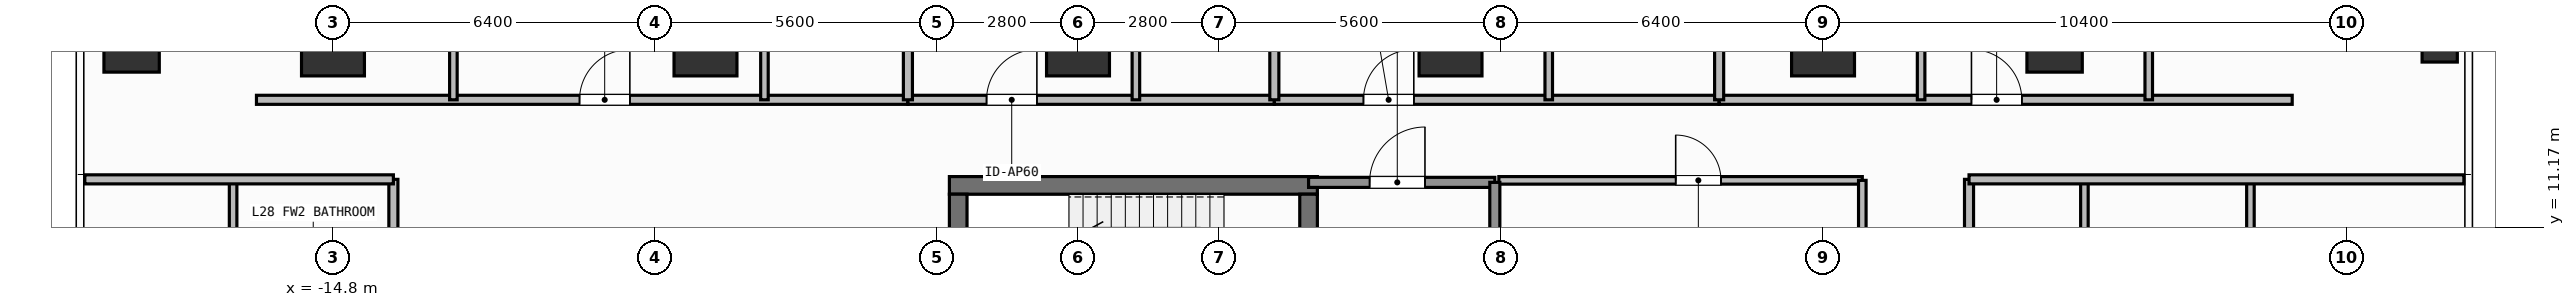
"""IFC4 building model, lengths in metres.
Left out: names, types, materials, properties, quantities, classifications, styles, units other than length and angle.
Written with IfcOpenShell. Run it as: python <this file> out.ifc"""

import sys

from ifc_helpers import new_model, si_unit, direction, frame, frame_2d, origin, origin_2d, place, context, subcontext, project, spatial, rectangle, hollow_rectangle, extrude, element, fill, save


model = new_model("IFC4")
c1 = context("Model", 3, precision=1e-05, world=origin(), true_north=direction((0.0, 1.0)))
c2 = subcontext(c1, "Body", "Model", "MODEL_VIEW")
j1 = project(units=[si_unit("LENGTHUNIT", "METRE"), si_unit("PLANEANGLEUNIT", "RADIAN")], contexts=[c1])
p1 = place(None, origin())
s1 = spatial("IfcSite", under=j1, at=p1, CompositionType="ELEMENT")
p2 = place(p1, origin())
s2 = spatial("IfcBuilding", under=s1, at=p2, CompositionType="ELEMENT")
p3 = place(p2, frame((0.0, 0.0, 113.4)))
s3 = spatial("IfcBuildingStorey", under=s2, at=p3, CompositionType="ELEMENT", Elevation=113.4)
p4 = place(p3, frame((-2.555, 12.0, 0.0), z_axis=(0.0, 0.0, 1.0), x_axis=(1.0, 0.0, 0.0)))
e1 = element("IfcWall", 1, at=p4, inside=s3, PredefinedType="SHEAR", context=c2, shape_type="SweptSolid", body=[
    extrude(rectangle(XDim=7.31, YDim=0.35, at=frame_2d((3.655, 0.0))), origin(), (0.0, 0.0, 1.0), 3.9),
])
p5 = place(p3, frame((-2.38, 8.9, 0.0), z_axis=(0.0, 0.0, 1.0), x_axis=(0.0, 1.0, 0.0)))
e2 = element("IfcWall", 2, at=p5, inside=s3, PredefinedType="SHEAR", context=c2, shape_type="SweptSolid", body=[
    extrude(rectangle(XDim=2.925, YDim=0.35, at=frame_2d((1.462, 0.0))), origin(), (0.0, 0.0, 1.0), 3.9),
])
p6 = place(p3, frame((4.58, 11.825, 0.0), z_axis=(0.0, 0.0, 1.0), x_axis=(0.0, -1.0, 0.0)))
e3 = element("IfcWall", 3, at=p6, inside=s3, PredefinedType="SHEAR", context=c2, shape_type="SweptSolid", body=[
    extrude(rectangle(XDim=2.925, YDim=0.35, at=frame_2d((1.462, 0.0))), origin(), (0.0, 0.0, 1.0), 3.9),
])
p7 = place(p6, frame((0.913, 0.0, 0.0)))
e4 = element("IfcOpeningElement", 4, at=p7, cuts=e3, PredefinedType="OPENING", context=c2, shape_type="SweptSolid", body=[
    extrude(rectangle(XDim=1.1, YDim=2.15, at=frame_2d((0.55, 1.075))), frame((0.0, 0.185, 0.0), z_axis=(0.0, -1.0, 0.0), x_axis=(1.0, 0.0, 0.0)), (0.0, 0.0, 1.0), 0.37),
])
for number, where, z_axis, x_axis in (
    (5, (-14.8, 14.8, 0.0), (0.0, 0.0, 1.0), (1.0, 0.0, 0.0)),
    (6, (-7.4, 14.8, 0.0), (0.0, 0.0, 1.0), (1.0, 0.0, 0.0)),
    (7, (0.0, 14.8, 0.0), (0.0, 0.0, 1.0), (1.0, 0.0, 0.0)),
    (8, (7.4, 14.8, 0.0), (0.0, 0.0, 1.0), (1.0, 0.0, 0.0)),
    (9, (14.8, 14.8, 0.0), (0.0, 0.0, 1.0), (1.0, 0.0, 0.0)),
):
    element("IfcColumn", number, at=place(p3, frame(where, z_axis=z_axis, x_axis=x_axis)), inside=s3, PredefinedType="COLUMN", context=c2, shape_type="SweptSolid", body=[
        extrude(rectangle(XDim=1.25, YDim=1.25, at=origin_2d()), origin(), (0.0, 0.0, 1.0), 3.9),
    ])
for number, where, z_axis, x_axis in (
    (10, (-18.8, 14.8, 0.0), (0.0, 0.0, 1.0), (1.0, 0.0, 0.0)),
    (11, (19.4, 14.8, 0.0), (0.0, 0.0, 1.0), (1.0, 0.0, 0.0)),
):
    element("IfcColumn", number, at=place(p3, frame(where, z_axis=z_axis, x_axis=x_axis)), inside=s3, PredefinedType="COLUMN", context=c2, shape_type="SweptSolid", body=[
        extrude(rectangle(XDim=1.1, YDim=1.1, at=origin_2d()), origin(), (0.0, 0.0, 1.0), 3.9),
    ])
p8 = place(p3, frame((27.05, 14.8, 0.0), z_axis=(0.0, 0.0, 1.0), x_axis=(1.0, 0.0, 0.0)))
e12 = element("IfcColumn", 12, at=p8, inside=s3, PredefinedType="COLUMN", context=c2, shape_type="SweptSolid", body=[
    extrude(hollow_rectangle(XDim=0.7, YDim=0.7, WallThickness=0.032, at=origin_2d()), origin(), (0.0, 0.0, 1.0), 3.9),
])
p9 = place(p3, frame((4.58, 12.06, 0.0), z_axis=(0.0, 0.0, 1.0), x_axis=(1.0, 0.0, 0.0)))
e13 = element("IfcWall", 13, at=p9, inside=s3, PredefinedType="SOLIDWALL", context=c2, shape_type="SweptSolid", body=[
    extrude(rectangle(XDim=3.7, YDim=0.2, at=frame_2d((1.85, 0.0))), origin(), (0.0, 0.0, 1.0), 3.68),
])
p10 = place(p9, frame((1.212, 0.0, 0.0)))
e14 = element("IfcOpeningElement", 14, at=p10, cuts=e13, PredefinedType="OPENING", context=c2, shape_type="SweptSolid", body=[
    extrude(rectangle(XDim=1.1, YDim=2.15, at=frame_2d((0.55, 1.075))), frame((0.0, 0.11, 0.0), z_axis=(0.0, -1.0, 0.0), x_axis=(1.0, 0.0, 0.0)), (0.0, 0.0, 1.0), 0.22),
])
p11 = place(p3, frame((8.36, 12.1, 0.0), z_axis=(0.0, 0.0, 1.0), x_axis=(1.0, 0.0, 0.0)))
e15 = element("IfcWall", 15, at=p11, inside=s3, PredefinedType="PARTITIONING", context=c2, shape_type="SweptSolid", body=[
    extrude(rectangle(XDim=7.22, YDim=0.15, at=frame_2d((3.61, 0.0))), origin(), (0.0, 0.0, 1.0), 3.68),
])
p12 = place(p11, frame((3.513, 0.0, 0.0)))
e16 = element("IfcOpeningElement", 16, at=p12, cuts=e15, PredefinedType="OPENING", context=c2, shape_type="SweptSolid", body=[
    extrude(rectangle(XDim=0.9, YDim=2.1, at=frame_2d((0.45, 1.05))), frame((0.0, 0.085, 0.0), z_axis=(0.0, -1.0, 0.0), x_axis=(1.0, 0.0, 0.0)), (0.0, 0.0, 1.0), 0.17),
])
p13 = place(p3, frame((-16.32, 13.7, 0.0), z_axis=(0.0, 0.0, 1.0), x_axis=(1.0, 0.0, 0.0)))
e17 = element("IfcWall", 17, at=p13, inside=s3, PredefinedType="PARTITIONING", context=c2, shape_type="SweptSolid", body=[
    extrude(rectangle(XDim=12.941, YDim=0.18, at=frame_2d((6.471, 0.0))), origin(), (0.0, 0.0, 1.0), 3.68),
])
p14 = place(p13, frame((6.417, 0.0, 0.0)))
e18 = element("IfcOpeningElement", 18, at=p14, cuts=e17, PredefinedType="OPENING", context=c2, shape_type="SweptSolid", body=[
    extrude(rectangle(XDim=1.0, YDim=2.2, at=frame_2d((0.5, 1.1))), frame((0.0, 0.1, 0.0), z_axis=(0.0, -1.0, 0.0), x_axis=(1.0, 0.0, 0.0)), (0.0, 0.0, 1.0), 0.2),
])
p15 = place(p3, frame((-12.408, 13.7, 0.0), z_axis=(0.0, 0.0, 1.0), x_axis=(0.0, 1.0, 0.0)))
e19 = element("IfcWall", 19, at=p15, inside=s3, PredefinedType="PARTITIONING", context=c2, shape_type="SweptSolid", body=[
    extrude(rectangle(XDim=6.664, YDim=0.15, at=frame_2d((3.332, 0.0))), origin(), (0.0, 0.0, 1.0), 3.68),
])
p16 = place(p15, frame((2.818, 0.0, 0.0)))
e20 = element("IfcOpeningElement", 20, at=p16, cuts=e19, PredefinedType="OPENING", context=c2, shape_type="SweptSolid", body=[
    extrude(rectangle(XDim=0.85, YDim=2.1, at=frame_2d((0.425, 1.05))), frame((0.0, 0.085, 0.0), z_axis=(0.0, -1.0, 0.0), x_axis=(1.0, 0.0, 0.0)), (0.0, 0.0, 1.0), 0.17),
])
p17 = place(p3, frame((-6.229, 13.7, 0.0), z_axis=(0.0, 0.0, 1.0), x_axis=(0.0, 1.0, 0.0)))
e21 = element("IfcWall", 21, at=p17, inside=s3, PredefinedType="PARTITIONING", context=c2, shape_type="SweptSolid", body=[
    extrude(rectangle(XDim=8.043, YDim=0.15, at=frame_2d((4.021, 0.0))), origin(), (0.0, 0.0, 1.0), 3.68),
])
p18 = place(p17, frame((3.685, 0.0, 0.0)))
e22 = element("IfcOpeningElement", 22, at=p18, cuts=e21, PredefinedType="OPENING", context=c2, shape_type="SweptSolid", body=[
    extrude(rectangle(XDim=0.85, YDim=2.1, at=frame_2d((0.425, 1.05))), frame((0.0, 0.085, 0.0), z_axis=(0.0, -1.0, 0.0), x_axis=(1.0, 0.0, 0.0)), (0.0, 0.0, 1.0), 0.17),
])
p19 = place(p3, frame((-3.379, 13.7, 0.0), z_axis=(0.0, 0.0, 1.0), x_axis=(1.0, 0.0, 0.0)))
e23 = element("IfcWall", 23, at=p19, inside=s3, PredefinedType="PARTITIONING", context=c2, shape_type="SweptSolid", body=[
    extrude(rectangle(XDim=7.279, YDim=0.18, at=frame_2d((3.639, 0.0))), origin(), (0.0, 0.0, 1.0), 3.68),
])
p20 = place(p19, frame((1.562, 0.0, 0.0)))
e24 = element("IfcOpeningElement", 24, at=p20, cuts=e23, PredefinedType="OPENING", context=c2, shape_type="SweptSolid", body=[
    extrude(rectangle(XDim=1.0, YDim=2.2, at=frame_2d((0.5, 1.1))), frame((0.0, 0.1, 0.0), z_axis=(0.0, -1.0, 0.0), x_axis=(1.0, 0.0, 0.0)), (0.0, 0.0, 1.0), 0.2),
])
p21 = place(p3, frame((1.15, 13.7, 0.0), z_axis=(0.0, 0.0, 1.0), x_axis=(0.0, 1.0, 0.0)))
e25 = element("IfcWall", 25, at=p21, inside=s3, PredefinedType="PARTITIONING", context=c2, shape_type="SweptSolid", body=[
    extrude(rectangle(XDim=6.32, YDim=0.15, at=frame_2d((3.16, 0.0))), origin(), (0.0, 0.0, 1.0), 3.68),
])
p22 = place(p21, frame((2.646, 0.0, 0.0)))
e26 = element("IfcOpeningElement", 26, at=p22, cuts=e25, PredefinedType="OPENING", context=c2, shape_type="SweptSolid", body=[
    extrude(rectangle(XDim=0.85, YDim=2.1, at=frame_2d((0.425, 1.05))), frame((0.0, 0.085, 0.0), z_axis=(0.0, -1.0, 0.0), x_axis=(1.0, 0.0, 0.0)), (0.0, 0.0, 1.0), 0.17),
])
p23 = place(p3, frame((3.9, 13.7, 0.0), z_axis=(0.0, 0.0, 1.0), x_axis=(1.0, 0.0, 0.0)))
e27 = element("IfcWall", 27, at=p23, inside=s3, PredefinedType="PARTITIONING", context=c2, shape_type="SweptSolid", body=[
    extrude(rectangle(XDim=8.836, YDim=0.18, at=frame_2d((4.418, 0.0))), origin(), (0.0, 0.0, 1.0), 3.68),
])
p24 = place(p23, frame((1.771, 0.0, 0.0)))
e28 = element("IfcOpeningElement", 28, at=p24, cuts=e27, PredefinedType="OPENING", context=c2, shape_type="SweptSolid", body=[
    extrude(rectangle(XDim=1.0, YDim=2.2, at=frame_2d((0.5, 1.1))), frame((0.0, 0.1, 0.0), z_axis=(0.0, -1.0, 0.0), x_axis=(1.0, 0.0, 0.0)), (0.0, 0.0, 1.0), 0.2),
])
p25 = place(p3, frame((9.351, 13.7, 0.0), z_axis=(0.0, 0.0, 1.0), x_axis=(0.0, 1.0, 0.0)))
e29 = element("IfcWall", 29, at=p25, inside=s3, PredefinedType="PARTITIONING", context=c2, shape_type="SweptSolid", body=[
    extrude(rectangle(XDim=6.32, YDim=0.15, at=frame_2d((3.16, 0.0))), origin(), (0.0, 0.0, 1.0), 3.68),
])
p26 = place(p25, frame((2.646, 0.0, 0.0)))
e30 = element("IfcOpeningElement", 30, at=p26, cuts=e29, PredefinedType="OPENING", context=c2, shape_type="SweptSolid", body=[
    extrude(rectangle(XDim=0.85, YDim=2.1, at=frame_2d((0.425, 1.05))), frame((0.0, 0.085, 0.0), z_axis=(0.0, -1.0, 0.0), x_axis=(1.0, 0.0, 0.0)), (0.0, 0.0, 1.0), 0.17),
])
p27 = place(p3, frame((12.736, 13.7, 0.0), z_axis=(0.0, 0.0, 1.0), x_axis=(1.0, 0.0, 0.0)))
e31 = element("IfcWall", 31, at=p27, inside=s3, PredefinedType="PARTITIONING", context=c2, shape_type="SweptSolid", body=[
    extrude(rectangle(XDim=11.384, YDim=0.18, at=frame_2d((5.692, 0.0))), origin(), (0.0, 0.0, 1.0), 3.68),
])
p28 = place(p27, frame((5.012, 0.0, 0.0)))
e32 = element("IfcOpeningElement", 32, at=p28, cuts=e31, PredefinedType="OPENING", context=c2, shape_type="SweptSolid", body=[
    extrude(rectangle(XDim=1.0, YDim=2.2, at=frame_2d((0.5, 1.1))), frame((0.0, 0.1, 0.0), z_axis=(0.0, -1.0, 0.0), x_axis=(1.0, 0.0, 0.0)), (0.0, 0.0, 1.0), 0.2),
])
p29 = place(p3, frame((16.748, 13.7, 0.0), z_axis=(0.0, 0.0, 1.0), x_axis=(0.0, 1.0, 0.0)))
e33 = element("IfcWall", 33, at=p29, inside=s3, PredefinedType="PARTITIONING", context=c2, shape_type="SweptSolid", body=[
    extrude(rectangle(XDim=6.664, YDim=0.15, at=frame_2d((3.332, 0.0))), origin(), (0.0, 0.0, 1.0), 3.68),
])
p30 = place(p29, frame((2.818, 0.0, 0.0)))
e34 = element("IfcOpeningElement", 34, at=p30, cuts=e33, PredefinedType="OPENING", context=c2, shape_type="SweptSolid", body=[
    extrude(rectangle(XDim=0.85, YDim=2.1, at=frame_2d((0.425, 1.05))), frame((0.0, 0.085, 0.0), z_axis=(0.0, -1.0, 0.0), x_axis=(1.0, 0.0, 0.0)), (0.0, 0.0, 1.0), 0.17),
])
p31 = place(p3, frame((21.27, 13.7, 0.0), z_axis=(0.0, 0.0, 1.0), x_axis=(0.0, 1.0, 0.0)))
e35 = element("IfcWall", 35, at=p31, inside=s3, PredefinedType="PARTITIONING", context=c2, shape_type="SweptSolid", body=[
    extrude(rectangle(XDim=8.043, YDim=0.15, at=frame_2d((4.021, 0.0))), origin(), (0.0, 0.0, 1.0), 3.68),
])
p32 = place(p31, frame((3.685, 0.0, 0.0)))
e36 = element("IfcOpeningElement", 36, at=p32, cuts=e35, PredefinedType="OPENING", context=c2, shape_type="SweptSolid", body=[
    extrude(rectangle(XDim=0.85, YDim=2.1, at=frame_2d((0.425, 1.05))), frame((0.0, 0.085, 0.0), z_axis=(0.0, -1.0, 0.0), x_axis=(1.0, 0.0, 0.0)), (0.0, 0.0, 1.0), 0.17),
])
p33 = place(p3, frame((-13.6, 1.018, 0.0), z_axis=(0.0, 0.0, 1.0), x_axis=(0.0, 1.0, 0.0)))
e37 = element("IfcWall", 37, at=p33, inside=s3, PredefinedType="PARTITIONING", context=c2, shape_type="SweptSolid", body=[
    extrude(rectangle(XDim=11.102, YDim=0.18, at=frame_2d((5.551, 0.0))), origin(), (0.0, 0.0, 1.0), 3.68),
])
p34 = place(p33, frame((4.606, 0.0, 0.0)))
e38 = element("IfcOpeningElement", 38, at=p34, cuts=e37, PredefinedType="OPENING", context=c2, shape_type="SweptSolid", body=[
    extrude(rectangle(XDim=1.0, YDim=2.2, at=frame_2d((0.5, 1.1))), frame((0.0, 0.1, 0.0), z_axis=(0.0, -1.0, 0.0), x_axis=(1.0, 0.0, 0.0)), (0.0, 0.0, 1.0), 0.2),
])
p35 = place(p3, frame((17.7, -12.12, 0.0), z_axis=(0.0, 0.0, 1.0), x_axis=(0.0, 1.0, 0.0)))
e39 = element("IfcWall", 39, at=p35, inside=s3, PredefinedType="PARTITIONING", context=c2, shape_type="SweptSolid", body=[
    extrude(rectangle(XDim=24.24, YDim=0.18, at=frame_2d((12.12, 0.0))), origin(), (0.0, 0.0, 1.0), 3.68),
])
p36 = place(p35, frame((11.62, 0.0, 0.0)))
e40 = element("IfcOpeningElement", 40, at=p36, cuts=e39, PredefinedType="OPENING", context=c2, shape_type="SweptSolid", body=[
    extrude(rectangle(XDim=1.0, YDim=2.2, at=frame_2d((0.5, 1.1))), frame((0.0, 0.1, 0.0), z_axis=(0.0, -1.0, 0.0), x_axis=(1.0, 0.0, 0.0)), (0.0, 0.0, 1.0), 0.2),
])
p37 = place(p3, frame((8.28, 8.875, 0.0), z_axis=(0.0, 0.0, 1.0), x_axis=(0.0, 1.0, 0.0)))
e41 = element("IfcWall", 41, at=p37, inside=s3, PredefinedType="SOLIDWALL", context=c2, shape_type="SweptSolid", body=[
    extrude(rectangle(XDim=3.185, YDim=0.2, at=frame_2d((1.593, 0.0))), origin(), (0.0, 0.0, 1.0), 3.68),
])
p38 = place(p3, frame((15.58, 5.85, 0.0), z_axis=(0.0, 0.0, 1.0), x_axis=(0.0, 1.0, 0.0)))
e42 = element("IfcWall", 42, at=p38, inside=s3, PredefinedType="PARTITIONING", context=c2, shape_type="SweptSolid", body=[
    extrude(rectangle(XDim=6.25, YDim=0.15, at=frame_2d((3.125, 0.0))), origin(), (0.0, 0.0, 1.0), 3.68),
])
for number, where, z_axis, x_axis in (
    (43, (-3.379, 13.7, 0.0), (0.0, 0.0, 1.0), (0.0, 1.0, 0.0)),
    (44, (3.9, 13.7, 0.0), (0.0, 0.0, 1.0), (0.0, 1.0, 0.0)),
    (45, (12.736, 13.7, 0.0), (0.0, 0.0, 1.0), (0.0, 1.0, 0.0)),
):
    element("IfcWall", number, at=place(p3, frame(where, z_axis=z_axis, x_axis=x_axis)), inside=s3, PredefinedType="PARTITIONING", context=c2, shape_type="SweptSolid", body=[
        extrude(rectangle(XDim=15.73, YDim=0.18, at=frame_2d((7.865, 0.0))), origin(), (0.0, 0.0, 1.0), 3.68),
    ])
p39 = place(p3, frame((-16.784, 8.394, 0.0), z_axis=(0.0, 0.0, 1.0), x_axis=(0.0, 1.0, 0.0)))
e46 = element("IfcWall", 46, at=p39, inside=s3, PredefinedType="PARTITIONING", context=c2, shape_type="SweptSolid", body=[
    extrude(rectangle(XDim=3.726, YDim=0.15, at=frame_2d((1.863, 0.0))), origin(), (0.0, 0.0, 1.0), 3.68),
])
p40 = place(p3, frame((-19.73, 12.12, 0.0), z_axis=(0.0, 0.0, 1.0), x_axis=(1.0, 0.0, 0.0)))
e47 = element("IfcWall", 47, at=p40, inside=s3, PredefinedType="PARTITIONING", context=c2, shape_type="SweptSolid", body=[
    extrude(rectangle(XDim=6.13, YDim=0.18, at=frame_2d((3.065, 0.0))), origin(), (0.0, 0.0, 1.0), 3.68),
])
for number, where, z_axis, x_axis in (
    (48, (19.992, 5.436, 0.0), (0.0, 0.0, 1.0), (0.0, 1.0, 0.0)),
    (49, (23.29, 5.436, 0.0), (0.0, 0.0, 1.0), (0.0, 1.0, 0.0)),
):
    element("IfcWall", number, at=place(p3, frame(where, z_axis=z_axis, x_axis=x_axis)), inside=s3, PredefinedType="PARTITIONING", context=c2, shape_type="SweptSolid", body=[
        extrude(rectangle(XDim=6.684, YDim=0.15, at=frame_2d((3.342, 0.0))), origin(), (0.0, 0.0, 1.0), 3.68),
    ])
p41 = place(p3, frame((17.7, 12.12, 0.0), z_axis=(0.0, 0.0, 1.0), x_axis=(1.0, 0.0, 0.0)))
e50 = element("IfcWall", 50, at=p41, inside=s3, PredefinedType="PARTITIONING", context=c2, shape_type="SweptSolid", body=[
    extrude(rectangle(XDim=9.83, YDim=0.18, at=frame_2d((4.915, 0.0))), origin(), (0.0, 0.0, 1.0), 3.68),
])
p42 = place(p10, origin())
e51 = element("IfcDoor", 51, at=p42, inside=s3, OperationType="SINGLE_SWING_RIGHT", PredefinedType="DOOR", context=c2, shape_type="SweptSolid", body=[
    extrude(rectangle(XDim=1.1, YDim=2.15, at=frame_2d((0.55, 1.075))), frame((0.0, 0.025, 0.0), z_axis=(0.0, -1.0, 0.0), x_axis=(1.0, 0.0, 0.0)), (0.0, 0.0, 1.0), 0.05),
])
fill(e14, e51)
p43 = place(p12, origin())
e52 = element("IfcDoor", 52, at=p43, inside=s3, OperationType="SINGLE_SWING_LEFT", PredefinedType="DOOR", context=c2, shape_type="SweptSolid", body=[
    extrude(rectangle(XDim=0.9, YDim=2.1, at=frame_2d((0.45, 1.05))), frame((0.0, 0.025, 0.0), z_axis=(0.0, -1.0, 0.0), x_axis=(1.0, 0.0, 0.0)), (0.0, 0.0, 1.0), 0.05),
])
fill(e16, e52)
p44 = place(p14, origin())
e53 = element("IfcDoor", 53, at=p44, inside=s3, OperationType="SINGLE_SWING_RIGHT", PredefinedType="DOOR", context=c2, shape_type="SweptSolid", body=[
    extrude(rectangle(XDim=1.0, YDim=2.2, at=frame_2d((0.5, 1.1))), frame((0.0, 0.025, 0.0), z_axis=(0.0, -1.0, 0.0), x_axis=(1.0, 0.0, 0.0)), (0.0, 0.0, 1.0), 0.05),
])
fill(e18, e53)
p45 = place(p20, origin())
e54 = element("IfcDoor", 54, at=p45, inside=s3, OperationType="SINGLE_SWING_RIGHT", PredefinedType="DOOR", context=c2, shape_type="SweptSolid", body=[
    extrude(rectangle(XDim=1.0, YDim=2.2, at=frame_2d((0.5, 1.1))), frame((0.0, 0.025, 0.0), z_axis=(0.0, -1.0, 0.0), x_axis=(1.0, 0.0, 0.0)), (0.0, 0.0, 1.0), 0.05),
])
fill(e24, e54)
p46 = place(p24, origin())
e55 = element("IfcDoor", 55, at=p46, inside=s3, OperationType="SINGLE_SWING_RIGHT", PredefinedType="DOOR", context=c2, shape_type="SweptSolid", body=[
    extrude(rectangle(XDim=1.0, YDim=2.2, at=frame_2d((0.5, 1.1))), frame((0.0, 0.025, 0.0), z_axis=(0.0, -1.0, 0.0), x_axis=(1.0, 0.0, 0.0)), (0.0, 0.0, 1.0), 0.05),
])
fill(e28, e55)
p47 = place(p28, origin())
e56 = element("IfcDoor", 56, at=p47, inside=s3, OperationType="SINGLE_SWING_LEFT", PredefinedType="DOOR", context=c2, shape_type="SweptSolid", body=[
    extrude(rectangle(XDim=1.0, YDim=2.2, at=frame_2d((0.5, 1.1))), frame((0.0, 0.025, 0.0), z_axis=(0.0, -1.0, 0.0), x_axis=(1.0, 0.0, 0.0)), (0.0, 0.0, 1.0), 0.05),
])
fill(e32, e56)
save(model, sys.argv[1])
